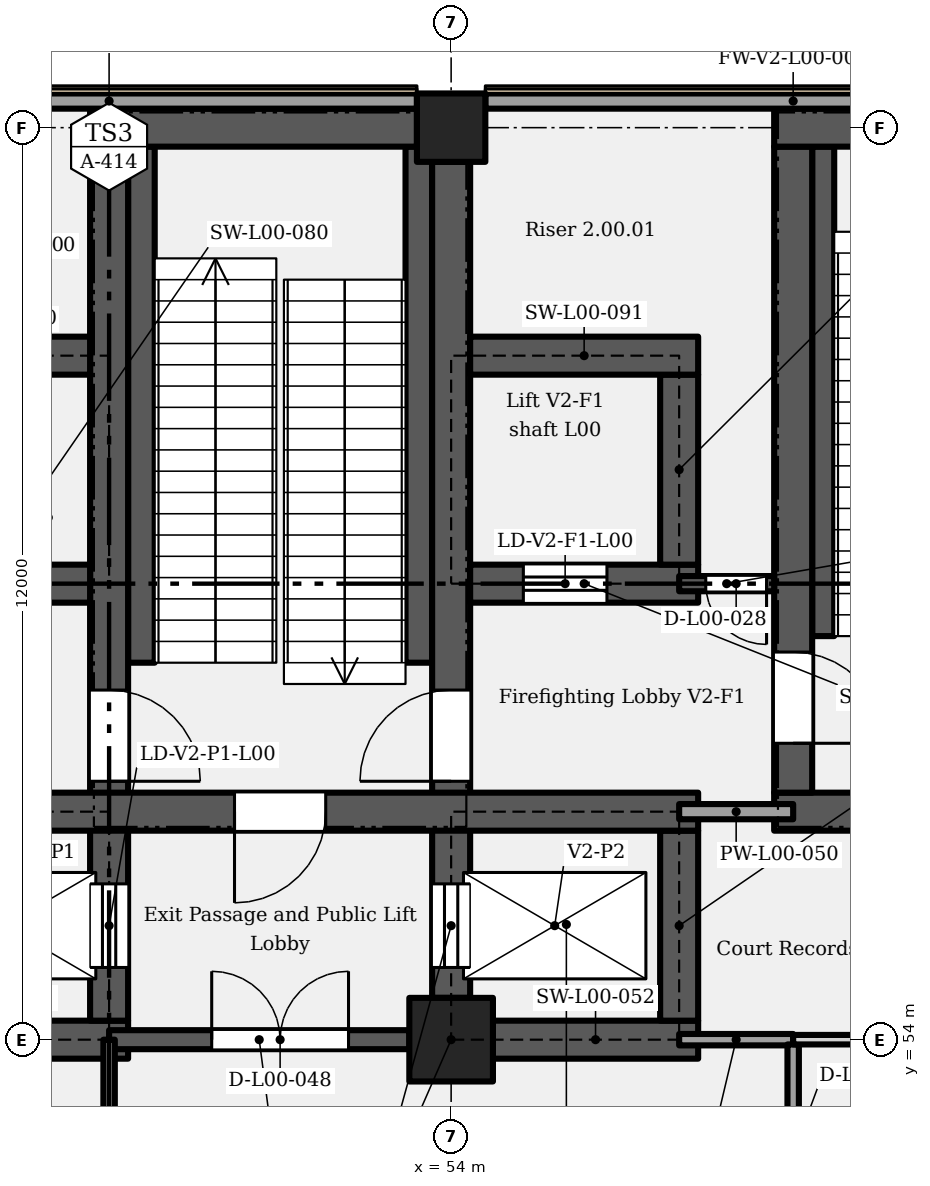
"""IFC4 building model, lengths in metres.
Left out: names, types, materials, properties, quantities, classifications, styles, units other than length and angle.
Written with IfcOpenShell. Run it as: python <this file> out.ifc"""

import sys

from ifc_helpers import new_model, si_unit, direction, frame, frame_2d, origin, origin_2d, place, context, subcontext, project, spatial, rectangle, extrude, element, fill, save


model = new_model("IFC4")
c1 = context("Model", 3, precision=1e-05, world=origin(), true_north=direction((0.0, 1.0)))
c2 = subcontext(c1, "Body", "Model", "MODEL_VIEW")
j1 = project(units=[si_unit("LENGTHUNIT", "METRE"), si_unit("PLANEANGLEUNIT", "RADIAN")], contexts=[c1])
p1 = place(None, origin())
s1 = spatial("IfcSite", under=j1, at=p1, CompositionType="ELEMENT")
p2 = place(p1, origin())
s2 = spatial("IfcBuilding", under=s1, at=p2, CompositionType="ELEMENT")
p3 = place(p2, origin())
s3 = spatial("IfcBuildingStorey", under=s2, at=p3, CompositionType="ELEMENT", Elevation=0.0)
p4 = place(p3, frame((54.0, 54.0, 0.0), z_axis=(0.0, 0.0, 1.0), x_axis=(1.0, 0.0, 0.0)))
e1 = element("IfcColumn", 1, at=p4, inside=s3, PredefinedType="COLUMN", context=c2, shape_type="SweptSolid", body=[
    extrude(rectangle(XDim=1.1, YDim=1.1, at=origin_2d()), origin(), (0.0, 0.0, 1.0), 6.6),
])
p5 = place(p3, frame((54.0, 66.0, 0.0), z_axis=(0.0, 0.0, 1.0), x_axis=(1.0, 0.0, 0.0)))
e2 = element("IfcColumn", 2, at=p5, inside=s3, PredefinedType="COLUMN", context=c2, shape_type="SweptSolid", body=[
    extrude(rectangle(XDim=0.9, YDim=0.9, at=origin_2d()), origin(), (0.0, 0.0, 1.0), 6.6),
])
p6 = place(p3, frame((46.25, 54.0, 0.0), z_axis=(0.0, 0.0, 1.0), x_axis=(1.0, 0.0, 0.0)))
e3 = element("IfcWall", 3, at=p6, inside=s3, PredefinedType="SHEAR", context=c2, shape_type="SweptSolid", body=[
    extrude(rectangle(XDim=3.5, YDim=0.5, at=frame_2d((1.75, 0.0))), origin(), (0.0, 0.0, 1.0), 6.3),
])
p7 = place(p3, frame((54.55, 54.0, 0.0), z_axis=(0.0, 0.0, 1.0), x_axis=(1.0, 0.0, 0.0)))
e4 = element("IfcWall", 4, at=p7, inside=s3, PredefinedType="SHEAR", context=c2, shape_type="SweptSolid", body=[
    extrude(rectangle(XDim=2.7, YDim=0.5, at=frame_2d((1.35, 0.0))), origin(), (0.0, 0.0, 1.0), 6.3),
])
p8 = place(p3, frame((49.5, 54.25, 0.0), z_axis=(0.0, 0.0, 1.0), x_axis=(0.0, 1.0, 0.0)))
e5 = element("IfcWall", 5, at=p8, inside=s3, PredefinedType="SHEAR", context=c2, shape_type="SweptSolid", body=[
    extrude(rectangle(XDim=11.5, YDim=0.5, at=frame_2d((5.75, 0.0))), origin(), (0.0, 0.0, 1.0), 6.3),
])
p9 = place(p8, frame((0.7, 0.0, 0.0)))
e6 = element("IfcOpeningElement", 6, at=p9, cuts=e5, PredefinedType="OPENING", context=c2, shape_type="SweptSolid", body=[
    extrude(rectangle(XDim=1.1, YDim=2.1, at=frame_2d((0.55, 1.05))), frame((0.0, 0.26, 0.0), z_axis=(0.0, -1.0, 0.0), x_axis=(1.0, 0.0, 0.0)), (0.0, 0.0, 1.0), 0.52),
])
p10 = place(p8, frame((4.35, 0.0, 0.0), z_axis=(0.0, 0.0, 1.0), x_axis=(-1.0, 0.0, 0.0)))
e7 = element("IfcOpeningElement", 7, at=p10, cuts=e5, PredefinedType="OPENING", context=c2, shape_type="SweptSolid", body=[
    extrude(rectangle(XDim=1.2, YDim=2.1, at=frame_2d((0.6, 1.05))), frame((0.0, 0.26, 0.0), z_axis=(0.0, -1.0, 0.0), x_axis=(1.0, 0.0, 0.0)), (0.0, 0.0, 1.0), 0.52),
])
p11 = place(p3, frame((57.0, 54.25, 0.0), z_axis=(0.0, 0.0, 1.0), x_axis=(0.0, 1.0, 0.0)))
e8 = element("IfcWall", 8, at=p11, inside=s3, PredefinedType="SHEAR", context=c2, shape_type="SweptSolid", body=[
    extrude(rectangle(XDim=2.5, YDim=0.5, at=frame_2d((1.25, 0.0))), origin(), (0.0, 0.0, 1.0), 6.3),
])
p12 = place(p3, frame((54.0, 54.55, 0.0), z_axis=(0.0, 0.0, 1.0), x_axis=(0.0, 1.0, 0.0)))
e9 = element("IfcWall", 9, at=p12, inside=s3, PredefinedType="SHEAR", context=c2, shape_type="SweptSolid", body=[
    extrude(rectangle(XDim=11.0, YDim=0.5, at=frame_2d((5.5, 0.0))), origin(), (0.0, 0.0, 1.0), 6.3),
])
p13 = place(p12, frame((0.4, 0.0, 0.0)))
e10 = element("IfcOpeningElement", 10, at=p13, cuts=e9, PredefinedType="OPENING", context=c2, shape_type="SweptSolid", body=[
    extrude(rectangle(XDim=1.1, YDim=2.1, at=frame_2d((0.55, 1.05))), frame((0.0, 0.26, 0.0), z_axis=(0.0, -1.0, 0.0), x_axis=(1.0, 0.0, 0.0)), (0.0, 0.0, 1.0), 0.52),
])
p14 = place(p12, frame((2.85, 0.0, 0.0)))
e11 = element("IfcOpeningElement", 11, at=p14, cuts=e9, PredefinedType="OPENING", context=c2, shape_type="SweptSolid", body=[
    extrude(rectangle(XDim=1.2, YDim=2.1, at=frame_2d((0.6, 1.05))), frame((0.0, 0.26, 0.0), z_axis=(0.0, -1.0, 0.0), x_axis=(1.0, 0.0, 0.0)), (0.0, 0.0, 1.0), 0.52),
])
p15 = place(p3, frame((46.25, 57.0, 0.0), z_axis=(0.0, 0.0, 1.0), x_axis=(1.0, 0.0, 0.0)))
e12 = element("IfcWall", 12, at=p15, inside=s3, PredefinedType="SHEAR", context=c2, shape_type="SweptSolid", body=[
    extrude(rectangle(XDim=11.0, YDim=0.5, at=frame_2d((5.5, 0.0))), origin(), (0.0, 0.0, 1.0), 6.3),
])
p16 = place(p15, frame((6.1, 0.0, 0.0), z_axis=(0.0, 0.0, 1.0), x_axis=(-1.0, 0.0, 0.0)))
e13 = element("IfcOpeningElement", 13, at=p16, cuts=e12, PredefinedType="OPENING", context=c2, shape_type="SweptSolid", body=[
    extrude(rectangle(XDim=1.2, YDim=2.1, at=frame_2d((0.6, 1.05))), frame((0.0, 0.26, 0.0), z_axis=(0.0, -1.0, 0.0), x_axis=(1.0, 0.0, 0.0)), (0.0, 0.0, 1.0), 0.52),
])
p17 = place(p3, frame((58.25, 57.0, 0.0), z_axis=(0.0, 0.0, 1.0), x_axis=(1.0, 0.0, 0.0)))
e14 = element("IfcWall", 14, at=p17, inside=s3, PredefinedType="SHEAR", context=c2, shape_type="SweptSolid", body=[
    extrude(rectangle(XDim=5.0, YDim=0.5, at=frame_2d((2.5, 0.0))), origin(), (0.0, 0.0, 1.0), 6.3),
])
p18 = place(p17, frame((2.0, 0.0, 0.0)))
e15 = element("IfcOpeningElement", 15, at=p18, cuts=e14, PredefinedType="OPENING", context=c2, shape_type="SweptSolid", body=[
    extrude(rectangle(XDim=1.0, YDim=2.1, at=frame_2d((0.5, 1.05))), frame((0.0, 0.26, 0.0), z_axis=(0.0, -1.0, 0.0), x_axis=(1.0, 0.0, 0.0)), (0.0, 0.0, 1.0), 0.52),
])
p19 = place(p3, frame((58.5, 57.25, 0.0), z_axis=(0.0, 0.0, 1.0), x_axis=(0.0, 1.0, 0.0)))
e16 = element("IfcWall", 16, at=p19, inside=s3, PredefinedType="SHEAR", context=c2, shape_type="SweptSolid", body=[
    extrude(rectangle(XDim=8.5, YDim=0.5, at=frame_2d((4.25, 0.0))), origin(), (0.0, 0.0, 1.0), 6.3),
])
p20 = place(p19, frame((1.85, 0.0, 0.0), z_axis=(0.0, 0.0, 1.0), x_axis=(-1.0, 0.0, 0.0)))
e17 = element("IfcOpeningElement", 17, at=p20, cuts=e16, PredefinedType="OPENING", context=c2, shape_type="SweptSolid", body=[
    extrude(rectangle(XDim=1.2, YDim=2.1, at=frame_2d((0.6, 1.05))), frame((0.0, 0.26, 0.0), z_axis=(0.0, -1.0, 0.0), x_axis=(1.0, 0.0, 0.0)), (0.0, 0.0, 1.0), 0.52),
])
p21 = place(p3, frame((46.25, 60.0, 0.0), z_axis=(0.0, 0.0, 1.0), x_axis=(1.0, 0.0, 0.0)))
e18 = element("IfcWall", 18, at=p21, inside=s3, PredefinedType="SHEAR", context=c2, shape_type="SweptSolid", body=[
    extrude(rectangle(XDim=3.0, YDim=0.5, at=frame_2d((1.5, 0.0))), origin(), (0.0, 0.0, 1.0), 6.3),
])
p22 = place(p3, frame((54.25, 60.0, 0.0), z_axis=(0.0, 0.0, 1.0), x_axis=(1.0, 0.0, 0.0)))
e19 = element("IfcWall", 19, at=p22, inside=s3, PredefinedType="SHEAR", context=c2, shape_type="SweptSolid", body=[
    extrude(rectangle(XDim=3.0, YDim=0.5, at=frame_2d((1.5, 0.0))), origin(), (0.0, 0.0, 1.0), 6.3),
])
p23 = place(p22, frame((0.7, 0.0, 0.0)))
e20 = element("IfcOpeningElement", 20, at=p23, cuts=e19, PredefinedType="OPENING", context=c2, shape_type="SweptSolid", body=[
    extrude(rectangle(XDim=1.1, YDim=2.1, at=frame_2d((0.55, 1.05))), frame((0.0, 0.26, 0.0), z_axis=(0.0, -1.0, 0.0), x_axis=(1.0, 0.0, 0.0)), (0.0, 0.0, 1.0), 0.52),
])
p24 = place(p3, frame((57.0, 60.25, 0.0), z_axis=(0.0, 0.0, 1.0), x_axis=(0.0, 1.0, 0.0)))
e21 = element("IfcWall", 21, at=p24, inside=s3, PredefinedType="SHEAR", context=c2, shape_type="SweptSolid", body=[
    extrude(rectangle(XDim=2.5, YDim=0.5, at=frame_2d((1.25, 0.0))), origin(), (0.0, 0.0, 1.0), 6.3),
])
for number, where, z_axis, x_axis in (
    (22, (46.25, 63.0, 0.0), (0.0, 0.0, 1.0), (1.0, 0.0, 0.0)),
    (23, (54.25, 63.0, 0.0), (0.0, 0.0, 1.0), (1.0, 0.0, 0.0)),
):
    element("IfcWall", number, at=place(p3, frame(where, z_axis=z_axis, x_axis=x_axis)), inside=s3, PredefinedType="SHEAR", context=c2, shape_type="SweptSolid", body=[
        extrude(rectangle(XDim=3.0, YDim=0.5, at=frame_2d((1.5, 0.0))), origin(), (0.0, 0.0, 1.0), 6.3),
    ])
for number, where, z_axis, x_axis in (
    (24, (49.25, 66.0, 0.0), (0.0, 0.0, 1.0), (1.0, 0.0, 0.0)),
    (25, (58.25, 66.0, 0.0), (0.0, 0.0, 1.0), (1.0, 0.0, 0.0)),
):
    element("IfcWall", number, at=place(p3, frame(where, z_axis=z_axis, x_axis=x_axis)), inside=s3, PredefinedType="SHEAR", context=c2, shape_type="SweptSolid", body=[
        extrude(rectangle(XDim=4.3, YDim=0.5, at=frame_2d((2.15, 0.0))), origin(), (0.0, 0.0, 1.0), 6.3),
    ])
p25 = place(p3, frame((45.45, 66.35, 0.0), z_axis=(0.0, 0.0, 1.0), x_axis=(1.0, 0.0, 0.0)))
e26 = element("IfcWall", 26, at=p25, inside=s3, PredefinedType="SOLIDWALL", context=c2, shape_type="SweptSolid", body=[
    extrude(rectangle(XDim=8.1, YDim=0.2, at=frame_2d((4.05, 0.0))), origin(), (0.0, 0.0, 1.0), 6.3),
])
p26 = place(p25, frame((0.6, 0.0, 0.9)))
e27 = element("IfcOpeningElement", 27, at=p26, cuts=e26, PredefinedType="OPENING", context=c2, shape_type="SweptSolid", body=[
    extrude(rectangle(XDim=2.4, YDim=3.3, at=frame_2d((1.2, 1.65))), frame((0.0, 0.11, 0.0), z_axis=(0.0, -1.0, 0.0), x_axis=(1.0, 0.0, 0.0)), (0.0, 0.0, 1.0), 0.22),
])
p27 = place(p3, frame((54.45, 66.35, 0.0), z_axis=(0.0, 0.0, 1.0), x_axis=(1.0, 0.0, 0.0)))
e28 = element("IfcWall", 28, at=p27, inside=s3, PredefinedType="SOLIDWALL", context=c2, shape_type="SweptSolid", body=[
    extrude(rectangle(XDim=8.1, YDim=0.2, at=frame_2d((4.05, 0.0))), origin(), (0.0, 0.0, 1.0), 6.3),
])
p28 = place(p3, frame((49.5, 54.0, 0.0), z_axis=(0.0, 0.0, 1.0), x_axis=(1.0, 0.0, 0.0)))
e29 = element("IfcWall", 29, at=p28, inside=s3, PredefinedType="SHEAR", context=c2, shape_type="SweptSolid", body=[
    extrude(rectangle(XDim=3.95, YDim=0.25, at=frame_2d((1.975, 0.0))), origin(), (0.0, 0.0, 1.0), 6.3),
])
p29 = place(p28, frame((1.35, 0.0, 0.0)))
e30 = element("IfcOpeningElement", 30, at=p29, cuts=e29, PredefinedType="OPENING", context=c2, shape_type="SweptSolid", body=[
    extrude(rectangle(XDim=1.8, YDim=2.1, at=frame_2d((0.9, 1.05))), frame((0.0, 0.135, 0.0), z_axis=(0.0, -1.0, 0.0), x_axis=(1.0, 0.0, 0.0)), (0.0, 0.0, 1.0), 0.27),
])
p30 = place(p3, frame((57.0, 54.0, 0.0), z_axis=(0.0, 0.0, 1.0), x_axis=(1.0, 0.0, 0.0)))
e31 = element("IfcWall", 31, at=p30, inside=s3, PredefinedType="PARTITIONING", context=c2, shape_type="SweptSolid", body=[
    extrude(rectangle(XDim=1.5, YDim=0.15, at=frame_2d((0.75, 0.0))), origin(), (0.0, 0.0, 1.0), 5.55),
])
p31 = place(p3, frame((58.5, 54.0, 0.0), z_axis=(0.0, 0.0, 1.0), x_axis=(1.0, 0.0, 0.0)))
e32 = element("IfcWall", 32, at=p31, inside=s3, PredefinedType="PARTITIONING", context=c2, shape_type="SweptSolid", body=[
    extrude(rectangle(XDim=3.95, YDim=0.125, at=frame_2d((1.975, 0.0))), origin(), (0.0, 0.0, 1.0), 5.55),
])
p32 = place(p3, frame((57.0, 57.0, 0.0), z_axis=(0.0, 0.0, 1.0), x_axis=(1.0, 0.0, 0.0)))
e33 = element("IfcWall", 33, at=p32, inside=s3, PredefinedType="PARTITIONING", context=c2, shape_type="SweptSolid", body=[
    extrude(rectangle(XDim=1.5, YDim=0.2, at=frame_2d((0.75, 0.0))), origin(), (0.0, 0.0, 1.0), 6.3),
])
p33 = place(p3, frame((57.0, 60.0, 0.0), z_axis=(0.0, 0.0, 1.0), x_axis=(1.0, 0.0, 0.0)))
e34 = element("IfcWall", 34, at=p33, inside=s3, PredefinedType="SHEAR", context=c2, shape_type="SweptSolid", body=[
    extrude(rectangle(XDim=1.25, YDim=0.2, at=frame_2d((0.625, 0.0))), origin(), (0.0, 0.0, 1.0), 6.3),
])
p34 = place(p33, frame((1.15, 0.0, 0.0), z_axis=(0.0, 0.0, 1.0), x_axis=(-1.0, 0.0, 0.0)))
e35 = element("IfcOpeningElement", 35, at=p34, cuts=e34, PredefinedType="OPENING", context=c2, shape_type="SweptSolid", body=[
    extrude(rectangle(XDim=0.8, YDim=2.0, at=frame_2d((0.4, 1.0))), frame((0.0, 0.11, 0.0), z_axis=(0.0, -1.0, 0.0), x_axis=(1.0, 0.0, 0.0)), (0.0, 0.0, 1.0), 0.22),
])
p35 = place(p3, frame((49.5, 42.0, 0.0), z_axis=(0.0, 0.0, 1.0), x_axis=(0.0, 1.0, 0.0)))
e36 = element("IfcWall", 36, at=p35, inside=s3, PredefinedType="PARTITIONING", context=c2, shape_type="SweptSolid", body=[
    extrude(rectangle(XDim=12.0, YDim=0.15, at=frame_2d((6.0, 0.0))), origin(), (0.0, 0.0, 1.0), 6.3),
])
p36 = place(p35, frame((0.9, 0.0, 0.0)))
e37 = element("IfcOpeningElement", 37, at=p36, cuts=e36, PredefinedType="OPENING", context=c2, shape_type="SweptSolid", body=[
    extrude(rectangle(XDim=1.2, YDim=2.1, at=frame_2d((0.6, 1.05))), frame((0.0, 0.085, 0.0), z_axis=(0.0, -1.0, 0.0), x_axis=(1.0, 0.0, 0.0)), (0.0, 0.0, 1.0), 0.17),
])
p37 = place(p35, frame((6.9, 0.0, 0.0)))
e38 = element("IfcOpeningElement", 38, at=p37, cuts=e36, PredefinedType="OPENING", context=c2, shape_type="SweptSolid", body=[
    extrude(rectangle(XDim=1.2, YDim=2.1, at=frame_2d((0.6, 1.05))), frame((0.0, 0.085, 0.0), z_axis=(0.0, -1.0, 0.0), x_axis=(1.0, 0.0, 0.0)), (0.0, 0.0, 1.0), 0.17),
])
p38 = place(p3, frame((58.5, 45.075, 0.0), z_axis=(0.0, 0.0, 1.0), x_axis=(0.0, 1.0, 0.0)))
e39 = element("IfcWall", 39, at=p38, inside=s3, PredefinedType="PARTITIONING", context=c2, shape_type="SweptSolid", body=[
    extrude(rectangle(XDim=8.863, YDim=0.15, at=frame_2d((4.431, 0.0))), origin(), (0.0, 0.0, 1.0), 6.3),
])
p39 = place(p38, frame((1.875, 0.0, 0.0), z_axis=(0.0, 0.0, 1.0), x_axis=(-1.0, 0.0, 0.0)))
e40 = element("IfcOpeningElement", 40, at=p39, cuts=e39, PredefinedType="OPENING", context=c2, shape_type="SweptSolid", body=[
    extrude(rectangle(XDim=0.9, YDim=2.1, at=frame_2d((0.45, 1.05))), frame((0.0, 0.085, 0.0), z_axis=(0.0, -1.0, 0.0), x_axis=(1.0, 0.0, 0.0)), (0.0, 0.0, 1.0), 0.17),
])
p40 = place(p38, frame((4.925, 0.0, 0.0), z_axis=(0.0, 0.0, 1.0), x_axis=(-1.0, 0.0, 0.0)))
e41 = element("IfcOpeningElement", 41, at=p40, cuts=e39, PredefinedType="OPENING", context=c2, shape_type="SweptSolid", body=[
    extrude(rectangle(XDim=1.0, YDim=2.1, at=frame_2d((0.5, 1.05))), frame((0.0, 0.085, 0.0), z_axis=(0.0, -1.0, 0.0), x_axis=(1.0, 0.0, 0.0)), (0.0, 0.0, 1.0), 0.17),
])
p41 = place(p38, frame((7.875, 0.0, 0.0), z_axis=(0.0, 0.0, 1.0), x_axis=(-1.0, 0.0, 0.0)))
e42 = element("IfcOpeningElement", 42, at=p41, cuts=e39, PredefinedType="OPENING", context=c2, shape_type="SweptSolid", body=[
    extrude(rectangle(XDim=0.9, YDim=2.1, at=frame_2d((0.45, 1.05))), frame((0.0, 0.085, 0.0), z_axis=(0.0, -1.0, 0.0), x_axis=(1.0, 0.0, 0.0)), (0.0, 0.0, 1.0), 0.17),
])
p42 = place(p3, frame((49.925, 58.96, 0.0), z_axis=(0.0, 0.0, 1.0), x_axis=(0.0, 1.0, 0.0)))
e43 = element("IfcWall", 43, at=p42, inside=s3, PredefinedType="SHEAR", context=c2, shape_type="SweptSolid", body=[
    extrude(rectangle(XDim=6.79, YDim=0.35, at=frame_2d((3.395, 0.0))), origin(), (0.0, 0.0, 1.0), 3.1),
])
p43 = place(p3, frame((53.575, 58.96, 0.0), z_axis=(0.0, 0.0, 1.0), x_axis=(0.0, 1.0, 0.0)))
e44 = element("IfcWall", 44, at=p43, inside=s3, PredefinedType="SHEAR", context=c2, shape_type="SweptSolid", body=[
    extrude(rectangle(XDim=6.79, YDim=0.35, at=frame_2d((3.395, 0.0))), origin(), (0.0, 0.0, 1.0), 6.3),
])
p44 = place(p3, frame((58.895, 59.31, 0.0), z_axis=(0.0, 0.0, 1.0), x_axis=(0.0, 1.0, 0.0)))
e45 = element("IfcWall", 45, at=p44, inside=s3, PredefinedType="SHEAR", context=c2, shape_type="SweptSolid", body=[
    extrude(rectangle(XDim=6.44, YDim=0.29, at=frame_2d((3.22, 0.0))), origin(), (0.0, 0.0, 1.0), 3.1),
])
p45 = place(p9, origin())
e46 = element("IfcDoor", 46, at=p45, inside=s3, OperationType="SLIDING_TO_LEFT", PredefinedType="DOOR", context=c2, shape_type="SweptSolid", body=[
    extrude(rectangle(XDim=1.1, YDim=2.1, at=frame_2d((0.55, 1.05))), frame((0.0, 0.025, 0.0), z_axis=(0.0, -1.0, 0.0), x_axis=(1.0, 0.0, 0.0)), (0.0, 0.0, 1.0), 0.05),
])
fill(e6, e46)
p46 = place(p13, origin())
e47 = element("IfcDoor", 47, at=p46, inside=s3, OperationType="SLIDING_TO_LEFT", PredefinedType="DOOR", context=c2, shape_type="SweptSolid", body=[
    extrude(rectangle(XDim=1.1, YDim=2.1, at=frame_2d((0.55, 1.05))), frame((0.0, 0.025, 0.0), z_axis=(0.0, -1.0, 0.0), x_axis=(1.0, 0.0, 0.0)), (0.0, 0.0, 1.0), 0.05),
])
fill(e10, e47)
p47 = place(p16, origin())
e48 = element("IfcDoor", 48, at=p47, inside=s3, OperationType="SINGLE_SWING_RIGHT", PredefinedType="DOOR", context=c2, shape_type="SweptSolid", body=[
    extrude(rectangle(XDim=1.2, YDim=2.1, at=frame_2d((0.6, 1.05))), frame((0.0, 0.025, 0.0), z_axis=(0.0, -1.0, 0.0), x_axis=(1.0, 0.0, 0.0)), (0.0, 0.0, 1.0), 0.05),
])
fill(e13, e48)
p48 = place(p23, origin())
e49 = element("IfcDoor", 49, at=p48, inside=s3, OperationType="SLIDING_TO_LEFT", PredefinedType="DOOR", context=c2, shape_type="SweptSolid", body=[
    extrude(rectangle(XDim=1.1, YDim=2.1, at=frame_2d((0.55, 1.05))), frame((0.0, 0.025, 0.0), z_axis=(0.0, -1.0, 0.0), x_axis=(1.0, 0.0, 0.0)), (0.0, 0.0, 1.0), 0.05),
])
fill(e20, e49)
p49 = place(p14, origin())
e50 = element("IfcDoor", 50, at=p49, inside=s3, OperationType="SINGLE_SWING_LEFT", PredefinedType="DOOR", context=c2, shape_type="SweptSolid", body=[
    extrude(rectangle(XDim=1.2, YDim=2.1, at=frame_2d((0.6, 1.05))), frame((0.0, 0.025, 0.0), z_axis=(0.0, -1.0, 0.0), x_axis=(1.0, 0.0, 0.0)), (0.0, 0.0, 1.0), 0.05),
])
fill(e11, e50)
p50 = place(p20, origin())
e51 = element("IfcDoor", 51, at=p50, inside=s3, OperationType="SINGLE_SWING_RIGHT", PredefinedType="DOOR", context=c2, shape_type="SweptSolid", body=[
    extrude(rectangle(XDim=1.2, YDim=2.1, at=frame_2d((0.6, 1.05))), frame((0.0, 0.025, 0.0), z_axis=(0.0, -1.0, 0.0), x_axis=(1.0, 0.0, 0.0)), (0.0, 0.0, 1.0), 0.05),
])
fill(e17, e51)
p51 = place(p34, origin())
e52 = element("IfcDoor", 52, at=p51, inside=s3, OperationType="SINGLE_SWING_LEFT", PredefinedType="DOOR", context=c2, shape_type="SweptSolid", body=[
    extrude(rectangle(XDim=0.8, YDim=2.0, at=frame_2d((0.4, 1.0))), frame((0.0, 0.025, 0.0), z_axis=(0.0, -1.0, 0.0), x_axis=(1.0, 0.0, 0.0)), (0.0, 0.0, 1.0), 0.05),
])
fill(e35, e52)
p52 = place(p10, origin())
e53 = element("IfcDoor", 53, at=p52, inside=s3, OperationType="SINGLE_SWING_RIGHT", PredefinedType="DOOR", context=c2, shape_type="SweptSolid", body=[
    extrude(rectangle(XDim=1.2, YDim=2.1, at=frame_2d((0.6, 1.05))), frame((0.0, 0.025, 0.0), z_axis=(0.0, -1.0, 0.0), x_axis=(1.0, 0.0, 0.0)), (0.0, 0.0, 1.0), 0.05),
])
fill(e7, e53)
p53 = place(p29, origin())
e54 = element("IfcDoor", 54, at=p53, inside=s3, OperationType="DOUBLE_DOOR_SINGLE_SWING", PredefinedType="DOOR", context=c2, shape_type="SweptSolid", body=[
    extrude(rectangle(XDim=1.8, YDim=2.1, at=frame_2d((0.9, 1.05))), frame((0.0, 0.025, 0.0), z_axis=(0.0, -1.0, 0.0), x_axis=(1.0, 0.0, 0.0)), (0.0, 0.0, 1.0), 0.05),
])
fill(e30, e54)
save(model, sys.argv[1])
